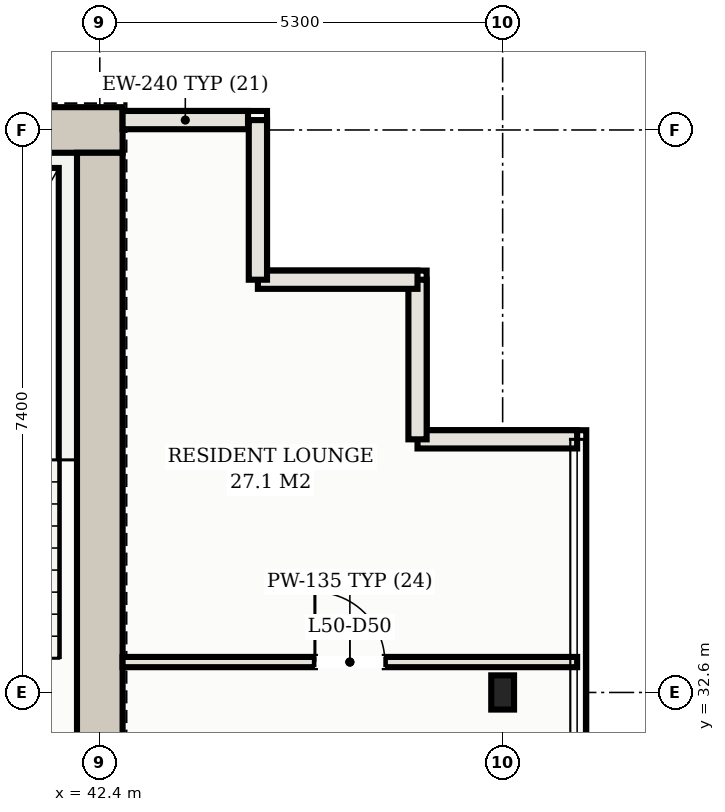
"""IFC4 building model, lengths in metres.
Left out: names, types, materials, properties, quantities, classifications, styles, units other than length and angle.
Written with IfcOpenShell. Run it as: python <this file> out.ifc"""

import sys

from ifc_helpers import new_model, si_unit, direction, frame, frame_2d, origin, origin_2d, place, context, subcontext, project, spatial, rectangle, hollow_rectangle, extrude, element, fill, save


model = new_model("IFC4")
c1 = context("Model", 3, precision=1e-05, world=origin(), true_north=direction((0.0, 1.0)))
c2 = subcontext(c1, "Body", "Model", "MODEL_VIEW")
j1 = project(units=[si_unit("LENGTHUNIT", "METRE"), si_unit("PLANEANGLEUNIT", "RADIAN")], contexts=[c1])
p1 = place(None, origin())
s1 = spatial("IfcSite", under=j1, at=p1, CompositionType="ELEMENT")
p2 = place(p1, origin())
s2 = spatial("IfcBuilding", under=s1, at=p2, CompositionType="ELEMENT")
p3 = place(p2, frame((0.0, 0.0, 182.1)))
s3 = spatial("IfcBuildingStorey", under=s2, at=p3, CompositionType="ELEMENT", Elevation=182.1)
p4 = place(p3, frame((10.3, 40.0, 0.0), z_axis=(0.0, 0.0, 1.0), x_axis=(1.0, 0.0, 0.0)))
e1 = element("IfcWall", 1, at=p4, inside=s3, PredefinedType="SHEAR", context=c2, shape_type="SweptSolid", body=[
    extrude(rectangle(XDim=32.4, YDim=0.6, at=frame_2d((16.2, 0.0))), origin(), (0.0, 0.0, 1.0), 3.03),
])
p5 = place(p3, frame((42.4, 25.5, 0.0), z_axis=(0.0, 0.0, 1.0), x_axis=(0.0, 1.0, 0.0)))
e2 = element("IfcWall", 2, at=p5, inside=s3, PredefinedType="SHEAR", context=c2, shape_type="SweptSolid", body=[
    extrude(rectangle(XDim=14.2, YDim=0.6, at=frame_2d((7.1, 0.0))), origin(), (0.0, 0.0, 1.0), 3.03),
])
p6 = place(p3, frame((47.7, 32.6, 0.0), z_axis=(0.0, 0.0, 1.0), x_axis=(1.0, 0.0, 0.0)))
e3 = element("IfcColumn", 3, at=p6, inside=s3, PredefinedType="COLUMN", context=c2, shape_type="SweptSolid", body=[
    extrude(hollow_rectangle(XDim=0.3, YDim=0.45, WallThickness=0.016, at=origin_2d()), origin(), (0.0, 0.0, 1.0), 3.3),
])
p7 = place(p3, frame((48.68, 35.93, 0.0), z_axis=(0.0, 0.0, 1.0), x_axis=(-1.0, 0.0, 0.0)))
e4 = element("IfcWall", 4, at=p7, inside=s3, PredefinedType="SOLIDWALL", context=c2, shape_type="SweptSolid", body=[
    extrude(rectangle(XDim=2.1, YDim=0.24, at=frame_2d((1.05, 0.0))), origin(), (0.0, 0.0, 1.0), 3.03),
])
for number, where, z_axis, x_axis in (
    (5, (46.58, 35.93, 0.0), (0.0, 0.0, 1.0), (0.0, 1.0, 0.0)),
    (6, (46.58, 38.03, 0.0), (0.0, 0.0, 1.0), (-1.0, 0.0, 0.0)),
):
    element("IfcWall", number, at=place(p3, frame(where, z_axis=z_axis, x_axis=x_axis)), inside=s3, PredefinedType="SOLIDWALL", context=c2, shape_type="SweptSolid", body=[
        extrude(rectangle(XDim=2.1, YDim=0.24, at=frame_2d((1.05, 0.0))), origin(), (0.0, 0.0, 1.0), 3.03),
    ])
p8 = place(p3, frame((44.48, 38.03, 0.0), z_axis=(0.0, 0.0, 1.0), x_axis=(0.0, 1.0, 0.0)))
e7 = element("IfcWall", 7, at=p8, inside=s3, PredefinedType="SOLIDWALL", context=c2, shape_type="SweptSolid", body=[
    extrude(rectangle(XDim=2.1, YDim=0.24, at=frame_2d((1.05, 0.0))), origin(), (0.0, 0.0, 1.0), 3.03),
])
p9 = place(p3, frame((44.35, 40.13, 0.0), z_axis=(0.0, 0.0, 1.0), x_axis=(-1.0, 0.0, 0.0)))
e8 = element("IfcWall", 8, at=p9, inside=s3, PredefinedType="SOLIDWALL", context=c2, shape_type="SweptSolid", body=[
    extrude(rectangle(XDim=1.65, YDim=0.24, at=frame_2d((0.825, 0.0))), origin(), (0.0, 0.0, 1.0), 3.03),
])
p10 = place(p3, frame((42.7, 33.0, 0.0), z_axis=(0.0, 0.0, 1.0), x_axis=(1.0, 0.0, 0.0)))
e9 = element("IfcWall", 9, at=p10, inside=s3, PredefinedType="PARTITIONING", context=c2, shape_type="SweptSolid", body=[
    extrude(rectangle(XDim=5.98, YDim=0.135, at=frame_2d((2.99, 0.0))), origin(), (0.0, 0.0, 1.0), 2.57),
])
p11 = place(p10, frame((2.53, 0.0, 0.0)))
e10 = element("IfcOpeningElement", 10, at=p11, cuts=e9, PredefinedType="OPENING", context=c2, shape_type="SweptSolid", body=[
    extrude(rectangle(XDim=0.92, YDim=2.15, at=frame_2d((0.46, 1.075))), frame((0.0, 0.078, 0.0), z_axis=(0.0, -1.0, 0.0), x_axis=(1.0, 0.0, 0.0)), (0.0, 0.0, 1.0), 0.155),
])
p12 = place(p11, origin())
e11 = element("IfcDoor", 11, at=p12, inside=s3, OperationType="SINGLE_SWING_LEFT", PredefinedType="DOOR", context=c2, shape_type="SweptSolid", body=[
    extrude(rectangle(XDim=0.92, YDim=2.15, at=frame_2d((0.46, 1.075))), frame((0.0, 0.025, 0.0), z_axis=(0.0, -1.0, 0.0), x_axis=(1.0, 0.0, 0.0)), (0.0, 0.0, 1.0), 0.05),
])
fill(e10, e11)
save(model, sys.argv[1])
